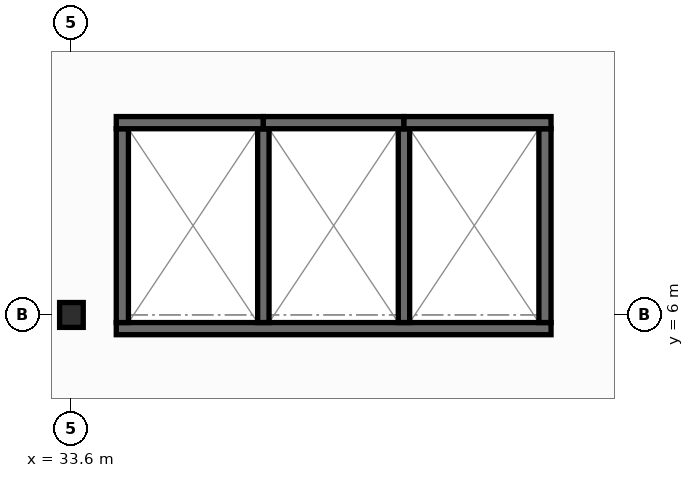
"""IFC4 building model, lengths in metres.
Left out: names, types, materials, properties, quantities, classifications, styles, units other than length and angle.
Written with IfcOpenShell. Run it as: python <this file> out.ifc"""

import sys

from ifc_helpers import new_model, si_unit, direction, frame, frame_2d, origin, origin_2d, place, context, subcontext, project, spatial, rectangle, i_section, extrude, element, save


model = new_model("IFC4")
c1 = context("Model", 3, precision=1e-05, world=origin(), true_north=direction((0.0, 1.0)))
c2 = subcontext(c1, "Body", "Model", "MODEL_VIEW")
j1 = project(units=[si_unit("LENGTHUNIT", "METRE"), si_unit("PLANEANGLEUNIT", "RADIAN")], contexts=[c1])
p1 = place(None, origin())
s1 = spatial("IfcSite", under=j1, at=p1, CompositionType="ELEMENT")
p2 = place(p1, origin())
s2 = spatial("IfcBuilding", under=s1, at=p2, CompositionType="ELEMENT")
p3 = place(p2, frame((0.0, 0.0, 62.0)))
s3 = spatial("IfcBuildingStorey", under=s2, at=p3, CompositionType="ELEMENT", Elevation=62.0)
p4 = place(p3, frame((33.6, 6.0, 0.0), z_axis=(0.0, 0.0, 1.0), x_axis=(1.0, 0.0, 0.0)))
e1 = element("IfcColumn", 1, at=p4, inside=s3, PredefinedType="COLUMN", context=c2, shape_type="SweptSolid", body=[
    extrude(i_section(OverallWidth=0.311, OverallDepth=0.327, WebThickness=0.016, FlangeThickness=0.025, FilletRadius=0.017, at=origin_2d()), origin(), (0.0, 0.0, 1.0), 3.95),
])
p5 = place(p3, frame((34.19, 5.82, 0.0), z_axis=(0.0, 0.0, 1.0), x_axis=(1.0, 0.0, 0.0)))
e2 = element("IfcWall", 2, at=p5, inside=s3, PredefinedType="SHEAR", context=c2, shape_type="SweptSolid", body=[
    extrude(rectangle(XDim=5.72, YDim=0.16, at=frame_2d((2.86, 0.0))), origin(), (0.0, 0.0, 1.0), 3.71),
])
for number, where, z_axis, x_axis in (
    (3, (34.27, 5.9, 0.0), (0.0, 0.0, 1.0), (0.0, 1.0, 0.0)),
    (4, (39.83, 5.9, 0.0), (0.0, 0.0, 1.0), (0.0, 1.0, 0.0)),
):
    element("IfcWall", number, at=place(p3, frame(where, z_axis=z_axis, x_axis=x_axis)), inside=s3, PredefinedType="SHEAR", context=c2, shape_type="SweptSolid", body=[
        extrude(rectangle(XDim=2.55, YDim=0.16, at=frame_2d((1.275, 0.0))), origin(), (0.0, 0.0, 1.0), 3.71),
    ])
for number, where, z_axis, x_axis in (
    (5, (36.125, 5.9, 0.0), (0.0, 0.0, 1.0), (0.0, 1.0, 0.0)),
    (6, (37.975, 5.9, 0.0), (0.0, 0.0, 1.0), (0.0, 1.0, 0.0)),
):
    element("IfcWall", number, at=place(p3, frame(where, z_axis=z_axis, x_axis=x_axis)), inside=s3, PredefinedType="SHEAR", context=c2, shape_type="SweptSolid", body=[
        extrude(rectangle(XDim=2.55, YDim=0.15, at=frame_2d((1.275, 0.0))), origin(), (0.0, 0.0, 1.0), 3.71),
    ])
p6 = place(p3, frame((34.19, 8.53, 0.0), z_axis=(0.0, 0.0, 1.0), x_axis=(1.0, 0.0, 0.0)))
e7 = element("IfcWall", 7, at=p6, inside=s3, PredefinedType="SHEAR", context=c2, shape_type="SweptSolid", body=[
    extrude(rectangle(XDim=1.935, YDim=0.16, at=frame_2d((0.968, 0.0))), origin(), (0.0, 0.0, 1.0), 3.71),
])
p7 = place(p3, frame((36.125, 8.53, 0.0), z_axis=(0.0, 0.0, 1.0), x_axis=(1.0, 0.0, 0.0)))
e8 = element("IfcWall", 8, at=p7, inside=s3, PredefinedType="SHEAR", context=c2, shape_type="SweptSolid", body=[
    extrude(rectangle(XDim=1.85, YDim=0.16, at=frame_2d((0.925, 0.0))), origin(), (0.0, 0.0, 1.0), 3.71),
])
p8 = place(p3, frame((37.975, 8.53, 0.0), z_axis=(0.0, 0.0, 1.0), x_axis=(1.0, 0.0, 0.0)))
e9 = element("IfcWall", 9, at=p8, inside=s3, PredefinedType="SHEAR", context=c2, shape_type="SweptSolid", body=[
    extrude(rectangle(XDim=1.935, YDim=0.16, at=frame_2d((0.967, 0.0))), origin(), (0.0, 0.0, 1.0), 3.71),
])
save(model, sys.argv[1])
